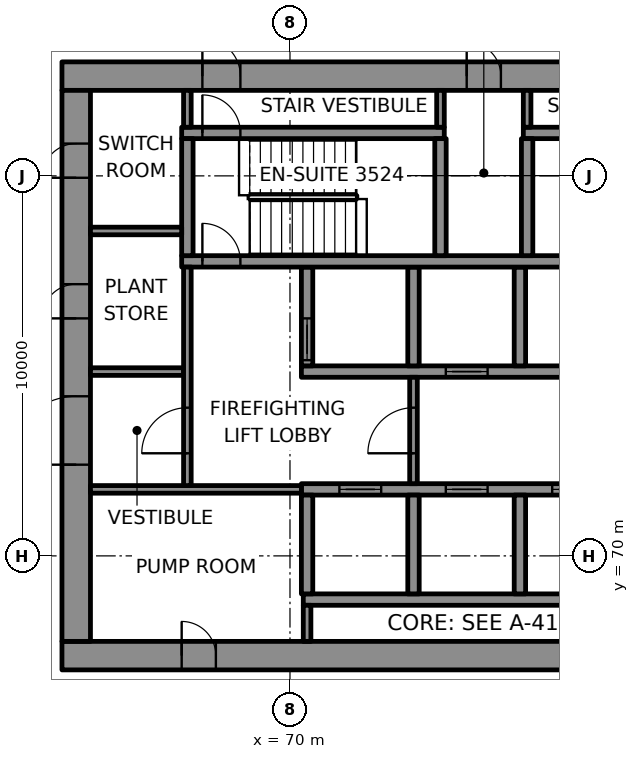
"""IFC4 building model, lengths in metres.
Left out: names, types, materials, properties, quantities, classifications, styles, units other than length and angle.
Written with IfcOpenShell. Run it as: python <this file> out.ifc"""

import sys

from ifc_helpers import new_model, si_unit, direction, frame, frame_2d, origin, place, context, subcontext, project, spatial, rectangle, extrude, element, fill, save


model = new_model("IFC4")
c1 = context("Model", 3, precision=1e-05, world=origin(), true_north=direction((0.0, 1.0)))
c2 = subcontext(c1, "Body", "Model", "MODEL_VIEW")
j1 = project(units=[si_unit("LENGTHUNIT", "METRE"), si_unit("PLANEANGLEUNIT", "RADIAN")], contexts=[c1])
p1 = place(None, origin())
s1 = spatial("IfcSite", under=j1, at=p1, CompositionType="ELEMENT")
p2 = place(p1, origin())
s2 = spatial("IfcBuilding", under=s1, at=p2, CompositionType="ELEMENT")
p3 = place(p2, frame((0.0, 0.0, 155.8)))
s3 = spatial("IfcBuildingStorey", under=s2, at=p3, CompositionType="ELEMENT", Elevation=155.8)
p4 = place(p3, frame((64.0, 67.375, 0.0), z_axis=(0.0, 0.0, 1.0), x_axis=(1.0, 0.0, 0.0)))
e1 = element("IfcWall", 1, at=p4, inside=s3, PredefinedType="SHEAR", context=c2, shape_type="SweptSolid", body=[
    extrude(rectangle(XDim=22.0, YDim=0.75, at=frame_2d((11.0, 0.0))), origin(), (0.0, 0.0, 1.0), 3.7),
])
p5 = place(p4, frame((3.15, 0.0, 0.0)))
e2 = element("IfcOpeningElement", 2, at=p5, cuts=e1, PredefinedType="OPENING", context=c2, shape_type="SweptSolid", body=[
    extrude(rectangle(XDim=0.9, YDim=2.1, at=frame_2d((0.45, 1.05))), frame((0.0, 0.385, 0.0), z_axis=(0.0, -1.0, 0.0), x_axis=(1.0, 0.0, 0.0)), (0.0, 0.0, 1.0), 0.77),
])
p6 = place(p3, frame((64.0, 82.625, 0.0), z_axis=(0.0, 0.0, 1.0), x_axis=(1.0, 0.0, 0.0)))
e3 = element("IfcWall", 3, at=p6, inside=s3, PredefinedType="SHEAR", context=c2, shape_type="SweptSolid", body=[
    extrude(rectangle(XDim=22.0, YDim=0.75, at=frame_2d((11.0, 0.0))), origin(), (0.0, 0.0, 1.0), 3.7),
])
p7 = place(p6, frame((3.695, 0.0, 0.0)))
e4 = element("IfcOpeningElement", 4, at=p7, cuts=e3, PredefinedType="OPENING", context=c2, shape_type="SweptSolid", body=[
    extrude(rectangle(XDim=1.0, YDim=2.1, at=frame_2d((0.5, 1.05))), frame((0.0, 0.385, 0.0), z_axis=(0.0, -1.0, 0.0), x_axis=(1.0, 0.0, 0.0)), (0.0, 0.0, 1.0), 0.77),
])
p8 = place(p6, frame((17.505, 0.0, 0.0)))
e5 = element("IfcOpeningElement", 5, at=p8, cuts=e3, PredefinedType="OPENING", context=c2, shape_type="SweptSolid", body=[
    extrude(rectangle(XDim=1.0, YDim=2.1, at=frame_2d((0.5, 1.05))), frame((0.0, 0.385, 0.0), z_axis=(0.0, -1.0, 0.0), x_axis=(1.0, 0.0, 0.0)), (0.0, 0.0, 1.0), 0.77),
])
p9 = place(p6, frame((10.65, 0.0, 0.0)))
e6 = element("IfcOpeningElement", 6, at=p9, cuts=e3, PredefinedType="OPENING", context=c2, shape_type="SweptSolid", body=[
    extrude(rectangle(XDim=0.9, YDim=2.1, at=frame_2d((0.45, 1.05))), frame((0.0, 0.385, 0.0), z_axis=(0.0, -1.0, 0.0), x_axis=(1.0, 0.0, 0.0)), (0.0, 0.0, 1.0), 0.77),
])
p10 = place(p3, frame((64.375, 67.75, 0.0), z_axis=(0.0, 0.0, 1.0), x_axis=(0.0, 1.0, 0.0)))
e7 = element("IfcWall", 7, at=p10, inside=s3, PredefinedType="SHEAR", context=c2, shape_type="SweptSolid", body=[
    extrude(rectangle(XDim=14.5, YDim=0.75, at=frame_2d((7.25, 0.0))), origin(), (0.0, 0.0, 1.0), 3.7),
])
p11 = place(p10, frame((4.65, 0.0, 0.0)))
e8 = element("IfcOpeningElement", 8, at=p11, cuts=e7, PredefinedType="OPENING", context=c2, shape_type="SweptSolid", body=[
    extrude(rectangle(XDim=1.8, YDim=2.1, at=frame_2d((0.9, 1.05))), frame((0.0, 0.385, 0.0), z_axis=(0.0, -1.0, 0.0), x_axis=(1.0, 0.0, 0.0)), (0.0, 0.0, 1.0), 0.77),
])
p12 = place(p10, frame((8.5, 0.0, 0.0)))
e9 = element("IfcOpeningElement", 9, at=p12, cuts=e7, PredefinedType="OPENING", context=c2, shape_type="SweptSolid", body=[
    extrude(rectangle(XDim=0.9, YDim=2.1, at=frame_2d((0.45, 1.05))), frame((0.0, 0.385, 0.0), z_axis=(0.0, -1.0, 0.0), x_axis=(1.0, 0.0, 0.0)), (0.0, 0.0, 1.0), 0.77),
])
p13 = place(p10, frame((12.2, 0.0, 0.0)))
e10 = element("IfcOpeningElement", 10, at=p13, cuts=e7, PredefinedType="OPENING", context=c2, shape_type="SweptSolid", body=[
    extrude(rectangle(XDim=0.9, YDim=2.1, at=frame_2d((0.45, 1.05))), frame((0.0, 0.385, 0.0), z_axis=(0.0, -1.0, 0.0), x_axis=(1.0, 0.0, 0.0)), (0.0, 0.0, 1.0), 0.77),
])
p14 = place(p3, frame((70.35, 68.85, 0.0), z_axis=(0.0, 0.0, 1.0), x_axis=(1.0, 0.0, 0.0)))
e11 = element("IfcWall", 11, at=p14, inside=s3, PredefinedType="SHEAR", context=c2, shape_type="SweptSolid", body=[
    extrude(rectangle(XDim=14.2, YDim=0.3, at=frame_2d((7.1, 0.0))), origin(), (0.0, 0.0, 1.0), 3.7),
])
p15 = place(p3, frame((70.3, 71.75, 0.0), z_axis=(0.0, 0.0, 1.0), x_axis=(1.0, 0.0, 0.0)))
e12 = element("IfcWall", 12, at=p15, inside=s3, PredefinedType="SHEAR", context=c2, shape_type="SweptSolid", body=[
    extrude(rectangle(XDim=14.3, YDim=0.3, at=frame_2d((7.15, 0.0))), origin(), (0.0, 0.0, 1.0), 3.7),
])
p16 = place(p15, frame((1.0, 0.0, 0.0)))
e13 = element("IfcOpeningElement", 13, at=p16, cuts=e12, PredefinedType="OPENING", context=c2, shape_type="SweptSolid", body=[
    extrude(rectangle(XDim=1.1, YDim=2.1, at=frame_2d((0.55, 1.05))), frame((0.0, 0.16, 0.0), z_axis=(0.0, -1.0, 0.0), x_axis=(1.0, 0.0, 0.0)), (0.0, 0.0, 1.0), 0.32),
])
p17 = place(p15, frame((3.8, 0.0, 0.0)))
e14 = element("IfcOpeningElement", 14, at=p17, cuts=e12, PredefinedType="OPENING", context=c2, shape_type="SweptSolid", body=[
    extrude(rectangle(XDim=1.1, YDim=2.1, at=frame_2d((0.55, 1.05))), frame((0.0, 0.16, 0.0), z_axis=(0.0, -1.0, 0.0), x_axis=(1.0, 0.0, 0.0)), (0.0, 0.0, 1.0), 0.32),
])
p18 = place(p15, frame((6.6, 0.0, 0.0)))
e15 = element("IfcOpeningElement", 15, at=p18, cuts=e12, PredefinedType="OPENING", context=c2, shape_type="SweptSolid", body=[
    extrude(rectangle(XDim=1.1, YDim=2.1, at=frame_2d((0.55, 1.05))), frame((0.0, 0.16, 0.0), z_axis=(0.0, -1.0, 0.0), x_axis=(1.0, 0.0, 0.0)), (0.0, 0.0, 1.0), 0.32),
])
p19 = place(p15, frame((9.4, 0.0, 0.0)))
e16 = element("IfcOpeningElement", 16, at=p19, cuts=e12, PredefinedType="OPENING", context=c2, shape_type="SweptSolid", body=[
    extrude(rectangle(XDim=1.1, YDim=2.1, at=frame_2d((0.55, 1.05))), frame((0.0, 0.16, 0.0), z_axis=(0.0, -1.0, 0.0), x_axis=(1.0, 0.0, 0.0)), (0.0, 0.0, 1.0), 0.32),
])
p20 = place(p15, frame((12.2, 0.0, 0.0)))
e17 = element("IfcOpeningElement", 17, at=p20, cuts=e12, PredefinedType="OPENING", context=c2, shape_type="SweptSolid", body=[
    extrude(rectangle(XDim=1.1, YDim=2.1, at=frame_2d((0.55, 1.05))), frame((0.0, 0.16, 0.0), z_axis=(0.0, -1.0, 0.0), x_axis=(1.0, 0.0, 0.0)), (0.0, 0.0, 1.0), 0.32),
])
p21 = place(p3, frame((70.3, 74.85, 0.0), z_axis=(0.0, 0.0, 1.0), x_axis=(1.0, 0.0, 0.0)))
e18 = element("IfcWall", 18, at=p21, inside=s3, PredefinedType="SHEAR", context=c2, shape_type="SweptSolid", body=[
    extrude(rectangle(XDim=14.3, YDim=0.3, at=frame_2d((7.15, 0.0))), origin(), (0.0, 0.0, 1.0), 3.7),
])
p22 = place(p21, frame((3.8, 0.0, 0.0)))
e19 = element("IfcOpeningElement", 19, at=p22, cuts=e18, PredefinedType="OPENING", context=c2, shape_type="SweptSolid", body=[
    extrude(rectangle(XDim=1.1, YDim=2.1, at=frame_2d((0.55, 1.05))), frame((0.0, 0.16, 0.0), z_axis=(0.0, -1.0, 0.0), x_axis=(1.0, 0.0, 0.0)), (0.0, 0.0, 1.0), 0.32),
])
p23 = place(p21, frame((12.2, 0.0, 0.0)))
e20 = element("IfcOpeningElement", 20, at=p23, cuts=e18, PredefinedType="OPENING", context=c2, shape_type="SweptSolid", body=[
    extrude(rectangle(XDim=1.1, YDim=2.1, at=frame_2d((0.55, 1.05))), frame((0.0, 0.16, 0.0), z_axis=(0.0, -1.0, 0.0), x_axis=(1.0, 0.0, 0.0)), (0.0, 0.0, 1.0), 0.32),
])
p24 = place(p3, frame((70.45, 69.0, 0.0), z_axis=(0.0, 0.0, 1.0), x_axis=(0.0, 1.0, 0.0)))
e21 = element("IfcWall", 21, at=p24, inside=s3, PredefinedType="SHEAR", context=c2, shape_type="SweptSolid", body=[
    extrude(rectangle(XDim=2.6, YDim=0.3, at=frame_2d((1.3, 0.0))), origin(), (0.0, 0.0, 1.0), 3.7),
])
p25 = place(p3, frame((70.45, 75.0, 0.0), z_axis=(0.0, 0.0, 1.0), x_axis=(0.0, 1.0, 0.0)))
e22 = element("IfcWall", 22, at=p25, inside=s3, PredefinedType="SHEAR", context=c2, shape_type="SweptSolid", body=[
    extrude(rectangle(XDim=2.6, YDim=0.3, at=frame_2d((1.3, 0.0))), origin(), (0.0, 0.0, 1.0), 3.7),
])
p26 = place(p25, frame((0.15, 0.0, 0.0)))
e23 = element("IfcOpeningElement", 23, at=p26, cuts=e22, PredefinedType="OPENING", context=c2, shape_type="SweptSolid", body=[
    extrude(rectangle(XDim=1.1, YDim=2.1, at=frame_2d((0.55, 1.05))), frame((0.0, 0.16, 0.0), z_axis=(0.0, -1.0, 0.0), x_axis=(1.0, 0.0, 0.0)), (0.0, 0.0, 1.0), 0.32),
])
for number, where, z_axis, x_axis in (
    (24, (73.25, 69.0, 0.0), (0.0, 0.0, 1.0), (0.0, 1.0, 0.0)),
    (25, (73.25, 75.0, 0.0), (0.0, 0.0, 1.0), (0.0, 1.0, 0.0)),
    (26, (76.05, 69.0, 0.0), (0.0, 0.0, 1.0), (0.0, 1.0, 0.0)),
    (27, (76.05, 75.0, 0.0), (0.0, 0.0, 1.0), (0.0, 1.0, 0.0)),
):
    element("IfcWall", number, at=place(p3, frame(where, z_axis=z_axis, x_axis=x_axis)), inside=s3, PredefinedType="SHEAR", context=c2, shape_type="SweptSolid", body=[
        extrude(rectangle(XDim=2.6, YDim=0.3, at=frame_2d((1.3, 0.0))), origin(), (0.0, 0.0, 1.0), 3.7),
    ])
p27 = place(p3, frame((67.15, 77.75, 0.0), z_axis=(0.0, 0.0, 1.0), x_axis=(1.0, 0.0, 0.0)))
e28 = element("IfcWall", 28, at=p27, inside=s3, PredefinedType="SHEAR", context=c2, shape_type="SweptSolid", body=[
    extrude(rectangle(XDim=17.45, YDim=0.3, at=frame_2d((8.725, 0.0))), origin(), (0.0, 0.0, 1.0), 3.7),
])
p28 = place(p27, frame((0.545, 0.0, 0.0)))
e29 = element("IfcOpeningElement", 29, at=p28, cuts=e28, PredefinedType="OPENING", context=c2, shape_type="SweptSolid", body=[
    extrude(rectangle(XDim=1.0, YDim=2.1, at=frame_2d((0.5, 1.05))), frame((0.0, 0.16, 0.0), z_axis=(0.0, -1.0, 0.0), x_axis=(1.0, 0.0, 0.0)), (0.0, 0.0, 1.0), 0.32),
])
p29 = place(p3, frame((67.15, 81.13, 0.0), z_axis=(0.0, 0.0, 1.0), x_axis=(1.0, 0.0, 0.0)))
e30 = element("IfcWall", 30, at=p29, inside=s3, PredefinedType="SHEAR", context=c2, shape_type="SweptSolid", body=[
    extrude(rectangle(XDim=6.91, YDim=0.3, at=frame_2d((3.455, 0.0))), origin(), (0.0, 0.0, 1.0), 3.7),
])
p30 = place(p29, frame((0.545, 0.0, 0.0)))
e31 = element("IfcOpeningElement", 31, at=p30, cuts=e30, PredefinedType="OPENING", context=c2, shape_type="SweptSolid", body=[
    extrude(rectangle(XDim=1.0, YDim=2.1, at=frame_2d((0.5, 1.05))), frame((0.0, 0.16, 0.0), z_axis=(0.0, -1.0, 0.0), x_axis=(1.0, 0.0, 0.0)), (0.0, 0.0, 1.0), 0.32),
])
p31 = place(p3, frame((76.14, 81.13, 0.0), z_axis=(0.0, 0.0, 1.0), x_axis=(1.0, 0.0, 0.0)))
e32 = element("IfcWall", 32, at=p31, inside=s3, PredefinedType="SHEAR", context=c2, shape_type="SweptSolid", body=[
    extrude(rectangle(XDim=6.86, YDim=0.3, at=frame_2d((3.43, 0.0))), origin(), (0.0, 0.0, 1.0), 3.7),
])
p32 = place(p31, frame((5.365, 0.0, 0.0)))
e33 = element("IfcOpeningElement", 33, at=p32, cuts=e32, PredefinedType="OPENING", context=c2, shape_type="SweptSolid", body=[
    extrude(rectangle(XDim=1.0, YDim=2.1, at=frame_2d((0.5, 1.05))), frame((0.0, 0.16, 0.0), z_axis=(0.0, -1.0, 0.0), x_axis=(1.0, 0.0, 0.0)), (0.0, 0.0, 1.0), 0.32),
])
for number, where, z_axis, x_axis in (
    (34, (67.3, 77.9, 0.0), (0.0, 0.0, 1.0), (0.0, 1.0, 0.0)),
    (35, (73.96, 77.9, 0.0), (0.0, 0.0, 1.0), (0.0, 1.0, 0.0)),
    (36, (76.24, 77.9, 0.0), (0.0, 0.0, 1.0), (0.0, 1.0, 0.0)),
):
    element("IfcWall", number, at=place(p3, frame(where, z_axis=z_axis, x_axis=x_axis)), inside=s3, PredefinedType="SHEAR", context=c2, shape_type="SweptSolid", body=[
        extrude(rectangle(XDim=3.08, YDim=0.3, at=frame_2d((1.54, 0.0))), origin(), (0.0, 0.0, 1.0), 3.7),
    ])
p33 = place(p3, frame((64.75, 71.75, 0.0), z_axis=(0.0, 0.0, 1.0), x_axis=(1.0, 0.0, 0.0)))
e37 = element("IfcWall", 37, at=p33, inside=s3, PredefinedType="PARTITIONING", context=c2, shape_type="SweptSolid", body=[
    extrude(rectangle(XDim=5.55, YDim=0.2, at=frame_2d((2.775, 0.0))), origin(), (0.0, 0.0, 1.0), 3.7),
])
p34 = place(p3, frame((64.75, 74.85, 0.0), z_axis=(0.0, 0.0, 1.0), x_axis=(1.0, 0.0, 0.0)))
e38 = element("IfcWall", 38, at=p34, inside=s3, PredefinedType="PARTITIONING", context=c2, shape_type="SweptSolid", body=[
    extrude(rectangle(XDim=2.45, YDim=0.2, at=frame_2d((1.225, 0.0))), origin(), (0.0, 0.0, 1.0), 3.7),
])
p35 = place(p3, frame((64.75, 78.55, 0.0), z_axis=(0.0, 0.0, 1.0), x_axis=(1.0, 0.0, 0.0)))
e39 = element("IfcWall", 39, at=p35, inside=s3, PredefinedType="PARTITIONING", context=c2, shape_type="SweptSolid", body=[
    extrude(rectangle(XDim=2.4, YDim=0.2, at=frame_2d((1.2, 0.0))), origin(), (0.0, 0.0, 1.0), 3.7),
])
p36 = place(p3, frame((67.3, 71.85, 0.0), z_axis=(0.0, 0.0, 1.0), x_axis=(0.0, 1.0, 0.0)))
e40 = element("IfcWall", 40, at=p36, inside=s3, PredefinedType="PARTITIONING", context=c2, shape_type="SweptSolid", body=[
    extrude(rectangle(XDim=5.75, YDim=0.2, at=frame_2d((2.875, 0.0))), origin(), (0.0, 0.0, 1.0), 3.7),
])
p37 = place(p36, frame((0.85, 0.0, 0.0)))
e41 = element("IfcOpeningElement", 41, at=p37, cuts=e40, PredefinedType="OPENING", context=c2, shape_type="SweptSolid", body=[
    extrude(rectangle(XDim=1.2, YDim=2.1, at=frame_2d((0.6, 1.05))), frame((0.0, 0.11, 0.0), z_axis=(0.0, -1.0, 0.0), x_axis=(1.0, 0.0, 0.0)), (0.0, 0.0, 1.0), 0.22),
])
p38 = place(p3, frame((67.3, 81.28, 0.0), z_axis=(0.0, 0.0, 1.0), x_axis=(0.0, 1.0, 0.0)))
e42 = element("IfcWall", 42, at=p38, inside=s3, PredefinedType="PARTITIONING", context=c2, shape_type="SweptSolid", body=[
    extrude(rectangle(XDim=0.97, YDim=0.2, at=frame_2d((0.485, 0.0))), origin(), (0.0, 0.0, 1.0), 3.7),
])
p39 = place(p3, frame((70.45, 67.75, 0.0), z_axis=(0.0, 0.0, 1.0), x_axis=(0.0, 1.0, 0.0)))
e43 = element("IfcWall", 43, at=p39, inside=s3, PredefinedType="PARTITIONING", context=c2, shape_type="SweptSolid", body=[
    extrude(rectangle(XDim=0.95, YDim=0.2, at=frame_2d((0.475, 0.0))), origin(), (0.0, 0.0, 1.0), 3.7),
])
p40 = place(p3, frame((73.25, 71.9, 0.0), z_axis=(0.0, 0.0, 1.0), x_axis=(0.0, 1.0, 0.0)))
e44 = element("IfcWall", 44, at=p40, inside=s3, PredefinedType="PARTITIONING", context=c2, shape_type="SweptSolid", body=[
    extrude(rectangle(XDim=2.8, YDim=0.2, at=frame_2d((1.4, 0.0))), origin(), (0.0, 0.0, 1.0), 3.7),
])
p41 = place(p40, frame((0.8, 0.0, 0.0)))
e45 = element("IfcOpeningElement", 45, at=p41, cuts=e44, PredefinedType="OPENING", context=c2, shape_type="SweptSolid", body=[
    extrude(rectangle(XDim=1.2, YDim=2.1, at=frame_2d((0.6, 1.05))), frame((0.0, 0.11, 0.0), z_axis=(0.0, -1.0, 0.0), x_axis=(1.0, 0.0, 0.0)), (0.0, 0.0, 1.0), 0.22),
])
for number, where, z_axis, x_axis in (
    (46, (73.96, 81.28, 0.0), (0.0, 0.0, 1.0), (0.0, 1.0, 0.0)),
    (47, (76.24, 81.28, 0.0), (0.0, 0.0, 1.0), (0.0, 1.0, 0.0)),
):
    element("IfcWall", number, at=place(p3, frame(where, z_axis=z_axis, x_axis=x_axis)), inside=s3, PredefinedType="PARTITIONING", context=c2, shape_type="SweptSolid", body=[
        extrude(rectangle(XDim=0.97, YDim=0.2, at=frame_2d((0.485, 0.0))), origin(), (0.0, 0.0, 1.0), 3.7),
    ])
p42 = place(p16, origin())
e48 = element("IfcDoor", 48, at=p42, inside=s3, OperationType="DOUBLE_DOOR_SLIDING", PredefinedType="DOOR", context=c2, shape_type="SweptSolid", body=[
    extrude(rectangle(XDim=1.1, YDim=2.1, at=frame_2d((0.55, 1.05))), frame((0.0, 0.025, 0.0), z_axis=(0.0, -1.0, 0.0), x_axis=(1.0, 0.0, 0.0)), (0.0, 0.0, 1.0), 0.05),
])
fill(e13, e48)
p43 = place(p17, origin())
e49 = element("IfcDoor", 49, at=p43, inside=s3, OperationType="DOUBLE_DOOR_SLIDING", PredefinedType="DOOR", context=c2, shape_type="SweptSolid", body=[
    extrude(rectangle(XDim=1.1, YDim=2.1, at=frame_2d((0.55, 1.05))), frame((0.0, 0.025, 0.0), z_axis=(0.0, -1.0, 0.0), x_axis=(1.0, 0.0, 0.0)), (0.0, 0.0, 1.0), 0.05),
])
fill(e14, e49)
p44 = place(p18, origin())
e50 = element("IfcDoor", 50, at=p44, inside=s3, OperationType="DOUBLE_DOOR_SLIDING", PredefinedType="DOOR", context=c2, shape_type="SweptSolid", body=[
    extrude(rectangle(XDim=1.1, YDim=2.1, at=frame_2d((0.55, 1.05))), frame((0.0, 0.025, 0.0), z_axis=(0.0, -1.0, 0.0), x_axis=(1.0, 0.0, 0.0)), (0.0, 0.0, 1.0), 0.05),
])
fill(e15, e50)
p45 = place(p26, origin())
e51 = element("IfcDoor", 51, at=p45, inside=s3, OperationType="DOUBLE_DOOR_SLIDING", PredefinedType="DOOR", context=c2, shape_type="SweptSolid", body=[
    extrude(rectangle(XDim=1.1, YDim=2.1, at=frame_2d((0.55, 1.05))), frame((0.0, 0.025, 0.0), z_axis=(0.0, -1.0, 0.0), x_axis=(1.0, 0.0, 0.0)), (0.0, 0.0, 1.0), 0.05),
])
fill(e23, e51)
p46 = place(p22, origin())
e52 = element("IfcDoor", 52, at=p46, inside=s3, OperationType="DOUBLE_DOOR_SLIDING", PredefinedType="DOOR", context=c2, shape_type="SweptSolid", body=[
    extrude(rectangle(XDim=1.1, YDim=2.1, at=frame_2d((0.55, 1.05))), frame((0.0, 0.025, 0.0), z_axis=(0.0, -1.0, 0.0), x_axis=(1.0, 0.0, 0.0)), (0.0, 0.0, 1.0), 0.05),
])
fill(e19, e52)
p47 = place(p28, origin())
e53 = element("IfcDoor", 53, at=p47, inside=s3, OperationType="SINGLE_SWING_LEFT", PredefinedType="DOOR", context=c2, shape_type="SweptSolid", body=[
    extrude(rectangle(XDim=1.0, YDim=2.1, at=frame_2d((0.5, 1.05))), frame((0.0, 0.025, 0.0), z_axis=(0.0, -1.0, 0.0), x_axis=(1.0, 0.0, 0.0)), (0.0, 0.0, 1.0), 0.05),
])
fill(e29, e53)
p48 = place(p30, origin())
e54 = element("IfcDoor", 54, at=p48, inside=s3, OperationType="SINGLE_SWING_RIGHT", PredefinedType="DOOR", context=c2, shape_type="SweptSolid", body=[
    extrude(rectangle(XDim=1.0, YDim=2.1, at=frame_2d((0.5, 1.05))), frame((0.0, 0.025, 0.0), z_axis=(0.0, -1.0, 0.0), x_axis=(1.0, 0.0, 0.0)), (0.0, 0.0, 1.0), 0.05),
])
fill(e31, e54)
p49 = place(p7, origin())
e55 = element("IfcDoor", 55, at=p49, inside=s3, OperationType="SINGLE_SWING_LEFT", PredefinedType="DOOR", context=c2, shape_type="SweptSolid", body=[
    extrude(rectangle(XDim=1.0, YDim=2.1, at=frame_2d((0.5, 1.05))), frame((0.0, 0.095, 0.0), z_axis=(0.0, -1.0, 0.0), x_axis=(1.0, 0.0, 0.0)), (0.0, 0.0, 1.0), 0.19),
])
fill(e4, e55)
p50 = place(p41, origin())
e56 = element("IfcDoor", 56, at=p50, inside=s3, OperationType="SINGLE_SWING_LEFT", PredefinedType="DOOR", context=c2, shape_type="SweptSolid", body=[
    extrude(rectangle(XDim=1.2, YDim=2.1, at=frame_2d((0.6, 1.05))), frame((0.0, 0.025, 0.0), z_axis=(0.0, -1.0, 0.0), x_axis=(1.0, 0.0, 0.0)), (0.0, 0.0, 1.0), 0.05),
])
fill(e45, e56)
p51 = place(p37, origin())
e57 = element("IfcDoor", 57, at=p51, inside=s3, OperationType="SINGLE_SWING_RIGHT", PredefinedType="DOOR", context=c2, shape_type="SweptSolid", body=[
    extrude(rectangle(XDim=1.2, YDim=2.1, at=frame_2d((0.6, 1.05))), frame((0.0, 0.025, 0.0), z_axis=(0.0, -1.0, 0.0), x_axis=(1.0, 0.0, 0.0)), (0.0, 0.0, 1.0), 0.05),
])
fill(e41, e57)
p52 = place(p11, origin())
e58 = element("IfcDoor", 58, at=p52, inside=s3, OperationType="SINGLE_SWING_LEFT", PredefinedType="DOOR", context=c2, shape_type="SweptSolid", body=[
    extrude(rectangle(XDim=1.8, YDim=2.1, at=frame_2d((0.9, 1.05))), frame((0.0, 0.095, 0.0), z_axis=(0.0, -1.0, 0.0), x_axis=(1.0, 0.0, 0.0)), (0.0, 0.0, 1.0), 0.19),
])
fill(e8, e58)
p53 = place(p5, origin())
e59 = element("IfcDoor", 59, at=p53, inside=s3, OperationType="SINGLE_SWING_LEFT", PredefinedType="DOOR", context=c2, shape_type="SweptSolid", body=[
    extrude(rectangle(XDim=0.9, YDim=2.1, at=frame_2d((0.45, 1.05))), frame((0.0, 0.095, 0.0), z_axis=(0.0, -1.0, 0.0), x_axis=(1.0, 0.0, 0.0)), (0.0, 0.0, 1.0), 0.19),
])
fill(e2, e59)
p54 = place(p12, origin())
e60 = element("IfcDoor", 60, at=p54, inside=s3, OperationType="SINGLE_SWING_RIGHT", PredefinedType="DOOR", context=c2, shape_type="SweptSolid", body=[
    extrude(rectangle(XDim=0.9, YDim=2.1, at=frame_2d((0.45, 1.05))), frame((0.0, 0.095, 0.0), z_axis=(0.0, -1.0, 0.0), x_axis=(1.0, 0.0, 0.0)), (0.0, 0.0, 1.0), 0.19),
])
fill(e9, e60)
p55 = place(p13, origin())
e61 = element("IfcDoor", 61, at=p55, inside=s3, OperationType="SINGLE_SWING_LEFT", PredefinedType="DOOR", context=c2, shape_type="SweptSolid", body=[
    extrude(rectangle(XDim=0.9, YDim=2.1, at=frame_2d((0.45, 1.05))), frame((0.0, 0.095, 0.0), z_axis=(0.0, -1.0, 0.0), x_axis=(1.0, 0.0, 0.0)), (0.0, 0.0, 1.0), 0.19),
])
fill(e10, e61)
p56 = place(p9, origin())
e62 = element("IfcDoor", 62, at=p56, inside=s3, OperationType="SINGLE_SWING_RIGHT", PredefinedType="DOOR", context=c2, shape_type="SweptSolid", body=[
    extrude(rectangle(XDim=0.9, YDim=2.1, at=frame_2d((0.45, 1.05))), frame((0.0, 0.095, 0.0), z_axis=(0.0, -1.0, 0.0), x_axis=(1.0, 0.0, 0.0)), (0.0, 0.0, 1.0), 0.19),
])
fill(e6, e62)
save(model, sys.argv[1])
